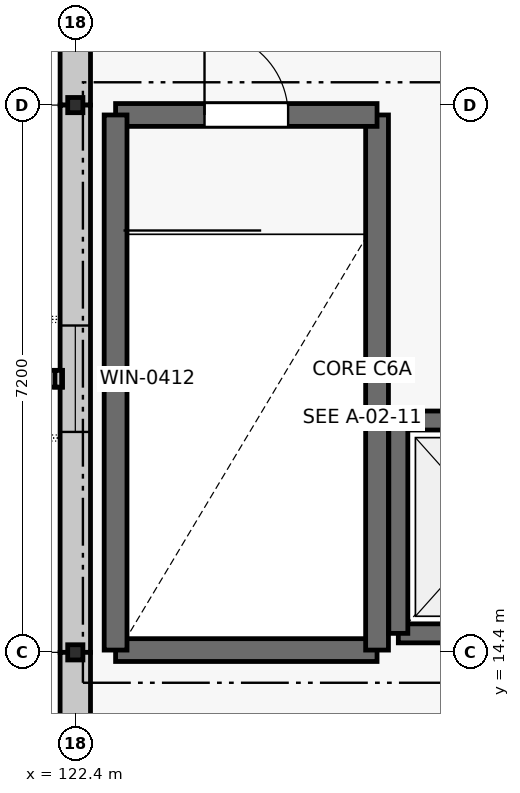
"""IFC4 building model, lengths in metres.
Left out: names, types, materials, properties, quantities, classifications, styles, units other than length and angle.
Written with IfcOpenShell. Run it as: python <this file> out.ifc"""

import sys

from ifc_helpers import new_model, si_unit, direction, frame, frame_2d, origin, origin_2d, place, context, subcontext, project, spatial, rectangle, i_section, extrude, element, fill, save


model = new_model("IFC4")
c1 = context("Model", 3, precision=1e-05, world=origin(), true_north=direction((0.0, 1.0)))
c2 = subcontext(c1, "Body", "Model", "MODEL_VIEW")
j1 = project(units=[si_unit("LENGTHUNIT", "METRE"), si_unit("PLANEANGLEUNIT", "RADIAN")], contexts=[c1])
p1 = place(None, origin())
s1 = spatial("IfcSite", under=j1, at=p1, CompositionType="ELEMENT")
p2 = place(p1, origin())
s2 = spatial("IfcBuilding", under=s1, at=p2, CompositionType="ELEMENT")
p3 = place(p2, frame((0.0, 0.0, 14.4)))
s3 = spatial("IfcBuildingStorey", under=s2, at=p3, CompositionType="ELEMENT", Elevation=14.4)
for number, where, z_axis, x_axis in (
    (1, (122.4, 14.4, 0.0), (0.0, 0.0, 1.0), (1.0, 0.0, 0.0)),
    (2, (122.4, 21.6, 0.0), (0.0, 0.0, 1.0), (1.0, 0.0, 0.0)),
):
    element("IfcColumn", number, at=place(p3, frame(where, z_axis=z_axis, x_axis=x_axis)), inside=s3, PredefinedType="COLUMN", context=c2, shape_type="SweptSolid", body=[
        extrude(i_section(OverallWidth=0.2, OverallDepth=0.2, WebThickness=0.009, FlangeThickness=0.015, FilletRadius=0.018, at=origin_2d()), origin(), (0.0, 0.0, 1.0), 4.2),
    ])
p4 = place(p3, frame((122.4, 28.696, 0.0), z_axis=(0.0, 0.0, 1.0), x_axis=(0.0, -1.0, 0.0)))
e3 = element("IfcWall", 3, at=p4, inside=s3, PredefinedType="SOLIDWALL", context=c2, shape_type="SweptSolid", body=[
    extrude(rectangle(XDim=7.096, YDim=0.4, at=frame_2d((3.548, 0.0))), origin(), (0.0, 0.0, 1.0), 3.24),
])
p5 = place(p4, frame((2.796, 0.0, 0.95)))
e4 = element("IfcOpeningElement", 4, at=p5, cuts=e3, PredefinedType="OPENING", context=c2, shape_type="SweptSolid", body=[
    extrude(rectangle(XDim=1.4, YDim=1.85, at=frame_2d((0.7, 0.925))), frame((0.0, 0.212, 0.0), z_axis=(0.0, -1.0, 0.0), x_axis=(1.0, 0.0, 0.0)), (0.0, 0.0, 1.0), 0.424),
])
p6 = place(p3, frame((122.4, 21.6, 0.0), z_axis=(0.0, 0.0, 1.0), x_axis=(0.0, -1.0, 0.0)))
e5 = element("IfcWall", 5, at=p6, inside=s3, PredefinedType="SOLIDWALL", context=c2, shape_type="SweptSolid", body=[
    extrude(rectangle(XDim=7.2, YDim=0.4, at=frame_2d((3.6, 0.0))), origin(), (0.0, 0.0, 1.0), 3.24),
])
p7 = place(p6, frame((2.9, 0.0, 0.95)))
e6 = element("IfcOpeningElement", 6, at=p7, cuts=e5, PredefinedType="OPENING", context=c2, shape_type="SweptSolid", body=[
    extrude(rectangle(XDim=1.4, YDim=1.85, at=frame_2d((0.7, 0.925))), frame((0.0, 0.212, 0.0), z_axis=(0.0, -1.0, 0.0), x_axis=(1.0, 0.0, 0.0)), (0.0, 0.0, 1.0), 0.424),
])
p8 = place(p3, frame((122.4, 14.4, 0.0), z_axis=(0.0, 0.0, 1.0), x_axis=(0.0, -1.0, 0.0)))
e7 = element("IfcWall", 7, at=p8, inside=s3, PredefinedType="SOLIDWALL", context=c2, shape_type="SweptSolid", body=[
    extrude(rectangle(XDim=7.2, YDim=0.4, at=frame_2d((3.6, 0.0))), origin(), (0.0, 0.0, 1.0), 3.24),
])
p9 = place(p8, frame((2.9, 0.0, 0.95)))
e8 = element("IfcOpeningElement", 8, at=p9, cuts=e7, PredefinedType="OPENING", context=c2, shape_type="SweptSolid", body=[
    extrude(rectangle(XDim=1.4, YDim=1.85, at=frame_2d((0.7, 0.925))), frame((0.0, 0.212, 0.0), z_axis=(0.0, -1.0, 0.0), x_axis=(1.0, 0.0, 0.0)), (0.0, 0.0, 1.0), 0.424),
])
p10 = place(p3, frame((122.93, 14.43, 0.0), z_axis=(0.0, 0.0, 1.0), x_axis=(1.0, 0.0, 0.0)))
e9 = element("IfcWall", 9, at=p10, inside=s3, PredefinedType="SHEAR", context=c2, shape_type="SweptSolid", body=[
    extrude(rectangle(XDim=3.44, YDim=0.3, at=frame_2d((1.72, 0.0))), origin(), (0.0, 0.0, 1.0), 3.96),
])
p11 = place(p3, frame((126.37, 14.43, 0.0), z_axis=(0.0, 0.0, 1.0), x_axis=(0.0, 1.0, 0.0)))
e10 = element("IfcWall", 10, at=p11, inside=s3, PredefinedType="SHEAR", context=c2, shape_type="SweptSolid", body=[
    extrude(rectangle(XDim=7.04, YDim=0.3, at=frame_2d((3.52, 0.0))), origin(), (0.0, 0.0, 1.0), 3.96),
])
p12 = place(p3, frame((126.37, 21.47, 0.0), z_axis=(0.0, 0.0, 1.0), x_axis=(-1.0, 0.0, 0.0)))
e11 = element("IfcWall", 11, at=p12, inside=s3, PredefinedType="SHEAR", context=c2, shape_type="SweptSolid", body=[
    extrude(rectangle(XDim=3.44, YDim=0.3, at=frame_2d((1.72, 0.0))), origin(), (0.0, 0.0, 1.0), 3.96),
])
p13 = place(p12, frame((1.17, 0.0, 0.0)))
e12 = element("IfcOpeningElement", 12, at=p13, cuts=e11, PredefinedType="OPENING", context=c2, shape_type="SweptSolid", body=[
    extrude(rectangle(XDim=1.1, YDim=2.15, at=frame_2d((0.55, 1.075))), frame((0.0, 0.162, 0.0), z_axis=(0.0, -1.0, 0.0), x_axis=(1.0, 0.0, 0.0)), (0.0, 0.0, 1.0), 0.324),
])
p14 = place(p3, frame((122.93, 21.47, 0.0), z_axis=(0.0, 0.0, 1.0), x_axis=(0.0, -1.0, 0.0)))
e13 = element("IfcWall", 13, at=p14, inside=s3, PredefinedType="SHEAR", context=c2, shape_type="SweptSolid", body=[
    extrude(rectangle(XDim=7.04, YDim=0.3, at=frame_2d((3.52, 0.0))), origin(), (0.0, 0.0, 1.0), 3.96),
])
p15 = place(p3, frame((126.65, 14.65, 0.0), z_axis=(0.0, 0.0, 1.0), x_axis=(1.0, 0.0, 0.0)))
e14 = element("IfcWall", 14, at=p15, inside=s3, PredefinedType="SHEAR", context=c2, shape_type="SweptSolid", body=[
    extrude(rectangle(XDim=2.55, YDim=0.25, at=frame_2d((1.275, 0.0))), origin(), (0.0, 0.0, 1.0), 3.96),
])
p16 = place(p3, frame((129.2, 17.45, 0.0), z_axis=(0.0, 0.0, 1.0), x_axis=(-1.0, 0.0, 0.0)))
e15 = element("IfcWall", 15, at=p16, inside=s3, PredefinedType="SHEAR", context=c2, shape_type="SweptSolid", body=[
    extrude(rectangle(XDim=2.55, YDim=0.25, at=frame_2d((1.275, 0.0))), origin(), (0.0, 0.0, 1.0), 3.96),
])
p17 = place(p16, frame((0.725, 0.0, 0.0)))
e16 = element("IfcOpeningElement", 16, at=p17, cuts=e15, PredefinedType="OPENING", context=c2, shape_type="SweptSolid", body=[
    extrude(rectangle(XDim=1.1, YDim=2.1, at=frame_2d((0.55, 1.05))), frame((0.0, 0.137, 0.0), z_axis=(0.0, -1.0, 0.0), x_axis=(1.0, 0.0, 0.0)), (0.0, 0.0, 1.0), 0.274),
])
p18 = place(p3, frame((126.65, 17.45, 0.0), z_axis=(0.0, 0.0, 1.0), x_axis=(0.0, -1.0, 0.0)))
e17 = element("IfcWall", 17, at=p18, inside=s3, PredefinedType="SHEAR", context=c2, shape_type="SweptSolid", body=[
    extrude(rectangle(XDim=2.8, YDim=0.25, at=frame_2d((1.4, 0.0))), origin(), (0.0, 0.0, 1.0), 3.96),
])
p19 = place(p7, origin())
e18 = element("IfcWindow", 18, at=p19, inside=s3, PartitioningType="SINGLE_PANEL", PredefinedType="WINDOW", context=c2, shape_type="SweptSolid", body=[
    extrude(rectangle(XDim=1.4, YDim=1.85, at=frame_2d((0.7, 0.925))), frame((0.0, 0.03, 0.0), z_axis=(0.0, -1.0, 0.0), x_axis=(1.0, 0.0, 0.0)), (0.0, 0.0, 1.0), 0.06),
])
fill(e6, e18)
p20 = place(p13, frame((1.1, 0.0, 0.0), z_axis=(0.0, 0.0, 1.0), x_axis=(-1.0, 0.0, 0.0)))
e19 = element("IfcDoor", 19, at=p20, inside=s3, OperationType="SINGLE_SWING_LEFT", PredefinedType="DOOR", context=c2, shape_type="SweptSolid", body=[
    extrude(rectangle(XDim=1.1, YDim=2.15, at=frame_2d((0.55, 1.075))), frame((0.0, 0.025, 0.0), z_axis=(0.0, -1.0, 0.0), x_axis=(1.0, 0.0, 0.0)), (0.0, 0.0, 1.0), 0.05),
])
fill(e12, e19)
save(model, sys.argv[1])
